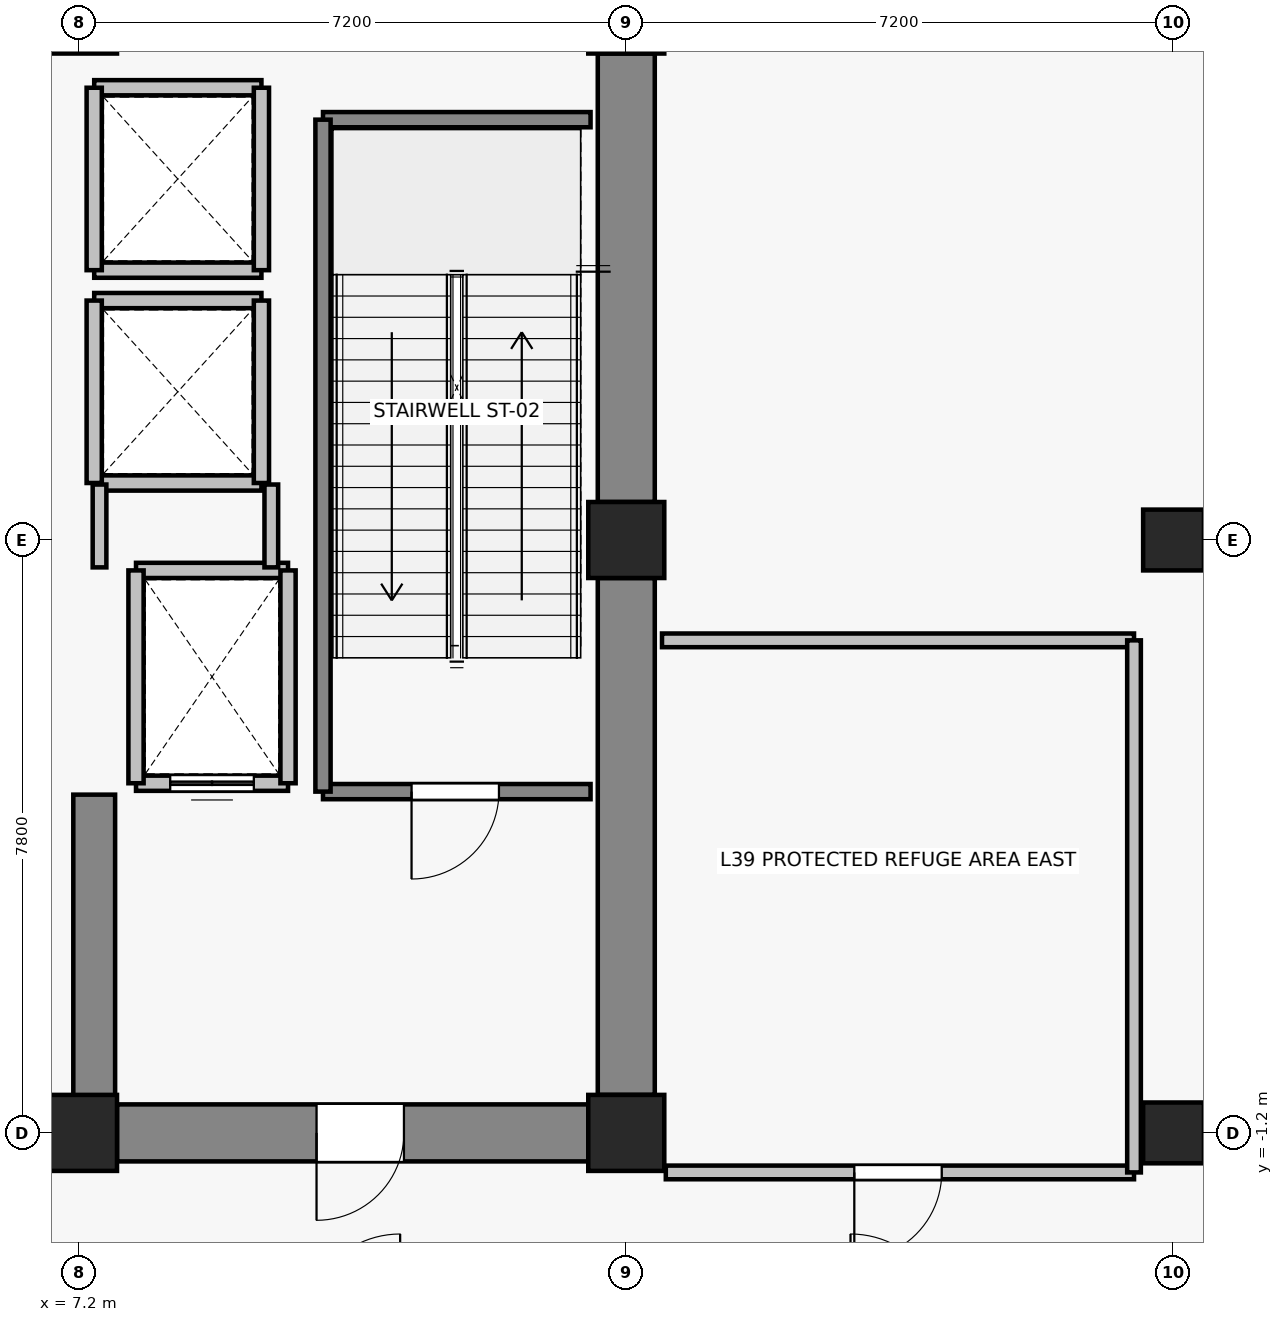
"""IFC4 building model, lengths in metres.
Left out: names, types, materials, properties, quantities, classifications, styles, units other than length and angle.
Written with IfcOpenShell. Run it as: python <this file> out.ifc"""

import sys

from ifc_helpers import new_model, si_unit, direction, frame, frame_2d, origin, origin_2d, place, context, subcontext, project, spatial, rectangle, extrude, source, transform, mapped, element, fill, save


model = new_model("IFC4")
c1 = context("Model", 3, precision=1e-05, world=origin(), true_north=direction((0.0, 1.0)))
c2 = subcontext(c1, "Body", "Model", "MODEL_VIEW")
j1 = project(units=[si_unit("LENGTHUNIT", "METRE"), si_unit("PLANEANGLEUNIT", "RADIAN")], contexts=[c1])
p1 = place(None, origin())
s1 = spatial("IfcSite", under=j1, at=p1, CompositionType="ELEMENT")
p2 = place(p1, origin())
s2 = spatial("IfcBuilding", under=s1, at=p2, CompositionType="ELEMENT")
p3 = place(p2, frame((0.0, 0.0, 139.6)))
s3 = spatial("IfcBuildingStorey", under=s2, at=p3, CompositionType="ELEMENT", Elevation=139.6)
for number, where, z_axis, x_axis in (
    (1, (7.2, -1.2, 0.0), (0.0, 0.0, 1.0), (1.0, 0.0, 0.0)),
    (2, (14.4, -1.2, 0.0), (0.0, 0.0, 1.0), (1.0, 0.0, 0.0)),
    (3, (14.4, 6.6, 0.0), (0.0, 0.0, 1.0), (1.0, 0.0, 0.0)),
    (4, (7.2, 13.5, 0.0), (0.0, 0.0, 1.0), (1.0, 0.0, 0.0)),
    (5, (14.4, 13.5, 0.0), (0.0, 0.0, 1.0), (1.0, 0.0, 0.0)),
):
    element("IfcColumn", number, at=place(p3, frame(where, z_axis=z_axis, x_axis=x_axis)), inside=s3, PredefinedType="COLUMN", context=c2, shape_type="SweptSolid", body=[
        extrude(rectangle(XDim=1.0, YDim=1.0, at=origin_2d()), origin(), (0.0, 0.0, 1.0), 6.6),
    ])
for number, where, z_axis, x_axis in (
    (6, (21.6, -1.2, 0.0), (0.0, 0.0, 1.0), (1.0, 0.0, 0.0)),
    (7, (21.6, 6.6, 0.0), (0.0, 0.0, 1.0), (1.0, 0.0, 0.0)),
):
    element("IfcColumn", number, at=place(p3, frame(where, z_axis=z_axis, x_axis=x_axis)), inside=s3, PredefinedType="COLUMN", context=c2, shape_type="SweptSolid", body=[
        extrude(rectangle(XDim=0.8, YDim=0.8, at=origin_2d()), origin(), (0.0, 0.0, 1.0), 6.6),
    ])
p4 = place(p3, frame((14.4, -0.7, 0.0), z_axis=(0.0, 0.0, 1.0), x_axis=(0.0, 1.0, 0.0)))
e8 = element("IfcWall", 8, at=p4, inside=s3, PredefinedType="SHEAR", context=c2, shape_type="SweptSolid", body=[
    extrude(rectangle(XDim=6.8, YDim=0.75, at=frame_2d((3.4, 0.0))), origin(), (0.0, 0.0, 1.0), 6.375),
])
p5 = place(p3, frame((14.4, 7.1, 0.0), z_axis=(0.0, 0.0, 1.0), x_axis=(0.0, 1.0, 0.0)))
e9 = element("IfcWall", 9, at=p5, inside=s3, PredefinedType="SHEAR", context=c2, shape_type="SweptSolid", body=[
    extrude(rectangle(XDim=5.9, YDim=0.75, at=frame_2d((2.95, 0.0))), origin(), (0.0, 0.0, 1.0), 6.375),
])
p6 = place(p3, frame((13.9, -1.2, 0.0), z_axis=(0.0, 0.0, 1.0), x_axis=(-1.0, 0.0, 0.0)))
e10 = element("IfcWall", 10, at=p6, inside=s3, PredefinedType="SHEAR", context=c2, shape_type="SweptSolid", body=[
    extrude(rectangle(XDim=6.2, YDim=0.75, at=frame_2d((3.1, 0.0))), origin(), (0.0, 0.0, 1.0), 6.375),
])
p7 = place(p6, frame((2.425, 0.0, 0.0)))
e11 = element("IfcOpeningElement", 11, at=p7, cuts=e10, PredefinedType="OPENING", context=c2, shape_type="SweptSolid", body=[
    extrude(rectangle(XDim=1.15, YDim=2.15, at=frame_2d((0.575, 1.075))), frame((0.0, 0.385, 0.0), z_axis=(0.0, -1.0, 0.0), x_axis=(1.0, 0.0, 0.0)), (0.0, 0.0, 1.0), 0.77),
])
p8 = place(p3, frame((7.4, -0.825, 0.0), z_axis=(0.0, 0.0, 1.0), x_axis=(0.0, 1.0, 0.0)))
e12 = element("IfcWall", 12, at=p8, inside=s3, PredefinedType="SHEAR", context=c2, shape_type="SweptSolid", body=[
    extrude(rectangle(XDim=4.075, YDim=0.55, at=frame_2d((2.038, 0.0))), origin(), (0.0, 0.0, 1.0), 6.375),
])
p9 = place(p3, frame((9.95, 3.4, 0.0), z_axis=(0.0, 0.0, 1.0), x_axis=(-1.0, 0.0, 0.0)))
e13 = element("IfcWall", 13, at=p9, inside=s3, PredefinedType="SOLIDWALL", context=c2, shape_type="SweptSolid", body=[
    extrude(rectangle(XDim=2.0, YDim=0.2, at=frame_2d((1.0, 0.0))), origin(), (0.0, 0.0, 1.0), 6.375),
])
p10 = place(p9, frame((0.45, 0.0, 0.0)))
e14 = element("IfcOpeningElement", 14, at=p10, cuts=e13, PredefinedType="OPENING", context=c2, shape_type="SweptSolid", body=[
    extrude(rectangle(XDim=1.1, YDim=2.2, at=frame_2d((0.55, 1.1))), frame((0.0, 0.11, 0.0), z_axis=(0.0, -1.0, 0.0), x_axis=(1.0, 0.0, 0.0)), (0.0, 0.0, 1.0), 0.22),
])
p11 = place(p3, frame((7.95, 6.2, 0.0), z_axis=(0.0, 0.0, 1.0), x_axis=(1.0, 0.0, 0.0)))
e15 = element("IfcWall", 15, at=p11, inside=s3, PredefinedType="SOLIDWALL", context=c2, shape_type="SweptSolid", body=[
    extrude(rectangle(XDim=2.0, YDim=0.2, at=frame_2d((1.0, 0.0))), origin(), (0.0, 0.0, 1.0), 6.375),
])
for number, where, z_axis, x_axis in (
    (16, (7.95, 3.4, 0.0), (0.0, 0.0, 1.0), (0.0, 1.0, 0.0)),
    (17, (9.95, 6.2, 0.0), (0.0, 0.0, 1.0), (0.0, -1.0, 0.0)),
):
    element("IfcWall", number, at=place(p3, frame(where, z_axis=z_axis, x_axis=x_axis)), inside=s3, PredefinedType="SOLIDWALL", context=c2, shape_type="SweptSolid", body=[
        extrude(rectangle(XDim=2.8, YDim=0.2, at=frame_2d((1.4, 0.0))), origin(), (0.0, 0.0, 1.0), 6.375),
    ])
for number, where, z_axis, x_axis in (
    (18, (9.6, 7.35, 0.0), (0.0, 0.0, 1.0), (-1.0, 0.0, 0.0)),
    (19, (7.4, 9.75, 0.0), (0.0, 0.0, 1.0), (1.0, 0.0, 0.0)),
):
    element("IfcWall", number, at=place(p3, frame(where, z_axis=z_axis, x_axis=x_axis)), inside=s3, PredefinedType="SOLIDWALL", context=c2, shape_type="SweptSolid", body=[
        extrude(rectangle(XDim=2.2, YDim=0.2, at=frame_2d((1.1, 0.0))), origin(), (0.0, 0.0, 1.0), 5.865),
    ])
p12 = place(p3, frame((7.4, 7.35, 0.0), z_axis=(0.0, 0.0, 1.0), x_axis=(0.0, 1.0, 0.0)))
e20 = element("IfcWall", 20, at=p12, inside=s3, PredefinedType="SOLIDWALL", context=c2, shape_type="SweptSolid", body=[
    extrude(rectangle(XDim=2.4, YDim=0.2, at=frame_2d((1.2, 0.0))), origin(), (0.0, 0.0, 1.0), 5.865),
])
p13 = place(p3, frame((9.6, 9.75, 0.0), z_axis=(0.0, 0.0, 1.0), x_axis=(0.0, -1.0, 0.0)))
e21 = element("IfcWall", 21, at=p13, inside=s3, PredefinedType="SOLIDWALL", context=c2, shape_type="SweptSolid", body=[
    extrude(rectangle(XDim=2.4, YDim=0.2, at=frame_2d((1.2, 0.0))), origin(), (0.0, 0.0, 1.0), 6.375),
])
for number, where, z_axis, x_axis in (
    (22, (9.6, 10.15, 0.0), (0.0, 0.0, 1.0), (-1.0, 0.0, 0.0)),
    (23, (7.4, 12.55, 0.0), (0.0, 0.0, 1.0), (1.0, 0.0, 0.0)),
):
    element("IfcWall", number, at=place(p3, frame(where, z_axis=z_axis, x_axis=x_axis)), inside=s3, PredefinedType="SOLIDWALL", context=c2, shape_type="SweptSolid", body=[
        extrude(rectangle(XDim=2.2, YDim=0.2, at=frame_2d((1.1, 0.0))), origin(), (0.0, 0.0, 1.0), 5.865),
    ])
p14 = place(p3, frame((7.4, 10.15, 0.0), z_axis=(0.0, 0.0, 1.0), x_axis=(0.0, 1.0, 0.0)))
e24 = element("IfcWall", 24, at=p14, inside=s3, PredefinedType="SOLIDWALL", context=c2, shape_type="SweptSolid", body=[
    extrude(rectangle(XDim=2.4, YDim=0.2, at=frame_2d((1.2, 0.0))), origin(), (0.0, 0.0, 1.0), 5.865),
])
p15 = place(p3, frame((9.6, 12.55, 0.0), z_axis=(0.0, 0.0, 1.0), x_axis=(0.0, -1.0, 0.0)))
e25 = element("IfcWall", 25, at=p15, inside=s3, PredefinedType="SOLIDWALL", context=c2, shape_type="SweptSolid", body=[
    extrude(rectangle(XDim=2.4, YDim=0.2, at=frame_2d((1.2, 0.0))), origin(), (0.0, 0.0, 1.0), 6.375),
])
p16 = place(p3, frame((13.93, 3.29, 0.0), z_axis=(0.0, 0.0, 1.0), x_axis=(-1.0, 0.0, 0.0)))
e26 = element("IfcWall", 26, at=p16, inside=s3, PredefinedType="SOLIDWALL", context=c2, shape_type="SweptSolid", body=[
    extrude(rectangle(XDim=3.52, YDim=0.2, at=frame_2d((1.76, 0.0))), origin(), (0.0, 0.0, 1.0), 6.375),
])
p17 = place(p16, frame((1.205, 0.0, 0.0)))
e27 = element("IfcOpeningElement", 27, at=p17, cuts=e26, PredefinedType="OPENING", context=c2, shape_type="SweptSolid", body=[
    extrude(rectangle(XDim=1.15, YDim=2.15, at=frame_2d((0.575, 1.075))), frame((0.0, 0.11, 0.0), z_axis=(0.0, -1.0, 0.0), x_axis=(1.0, 0.0, 0.0)), (0.0, 0.0, 1.0), 0.22),
])
p18 = place(p3, frame((10.41, 12.13, 0.0), z_axis=(0.0, 0.0, 1.0), x_axis=(1.0, 0.0, 0.0)))
e28 = element("IfcWall", 28, at=p18, inside=s3, PredefinedType="SOLIDWALL", context=c2, shape_type="SweptSolid", body=[
    extrude(rectangle(XDim=3.52, YDim=0.2, at=frame_2d((1.76, 0.0))), origin(), (0.0, 0.0, 1.0), 6.375),
])
p19 = place(p3, frame((10.41, 3.29, 0.0), z_axis=(0.0, 0.0, 1.0), x_axis=(0.0, 1.0, 0.0)))
e29 = element("IfcWall", 29, at=p19, inside=s3, PredefinedType="SOLIDWALL", context=c2, shape_type="SweptSolid", body=[
    extrude(rectangle(XDim=8.84, YDim=0.2, at=frame_2d((4.42, 0.0))), origin(), (0.0, 0.0, 1.0), 6.375),
])
p20 = place(p3, frame((7.47, 6.24, 0.0), z_axis=(0.0, 0.0, 1.0), x_axis=(0.0, 1.0, 0.0)))
e30 = element("IfcWall", 30, at=p20, inside=s3, PredefinedType="PARTITIONING", context=c2, shape_type="SweptSolid", body=[
    extrude(rectangle(XDim=1.09, YDim=0.18, at=frame_2d((0.545, 0.0))), origin(), (0.0, 0.0, 1.0), 5.865),
])
p21 = place(p3, frame((9.73, 7.33, 0.0), z_axis=(0.0, 0.0, 1.0), x_axis=(0.0, -1.0, 0.0)))
e31 = element("IfcWall", 31, at=p21, inside=s3, PredefinedType="PARTITIONING", context=c2, shape_type="SweptSolid", body=[
    extrude(rectangle(XDim=1.09, YDim=0.18, at=frame_2d((0.545, 0.0))), origin(), (0.0, 0.0, 1.0), 6.375),
])
p22 = place(p3, frame((21.08, -1.72, 0.0), z_axis=(0.0, 0.0, 1.0), x_axis=(-1.0, 0.0, 0.0)))
e32 = element("IfcWall", 32, at=p22, inside=s3, PredefinedType="PARTITIONING", context=c2, shape_type="SweptSolid", body=[
    extrude(rectangle(XDim=6.16, YDim=0.18, at=frame_2d((3.08, 0.0))), origin(), (0.0, 0.0, 1.0), 6.375),
])
p23 = place(p22, frame((2.53, 0.0, 0.0)))
e33 = element("IfcOpeningElement", 33, at=p23, cuts=e32, PredefinedType="OPENING", context=c2, shape_type="SweptSolid", body=[
    extrude(rectangle(XDim=1.15, YDim=2.15, at=frame_2d((0.575, 1.075))), frame((0.0, 0.1, 0.0), z_axis=(0.0, -1.0, 0.0), x_axis=(1.0, 0.0, 0.0)), (0.0, 0.0, 1.0), 0.2),
])
p24 = place(p3, frame((14.87, 5.28, 0.0), z_axis=(0.0, 0.0, 1.0), x_axis=(1.0, 0.0, 0.0)))
e34 = element("IfcWall", 34, at=p24, inside=s3, PredefinedType="PARTITIONING", context=c2, shape_type="SweptSolid", body=[
    extrude(rectangle(XDim=6.21, YDim=0.18, at=frame_2d((3.105, 0.0))), origin(), (0.0, 0.0, 1.0), 6.375),
])
p25 = place(p3, frame((21.08, 5.28, 0.0), z_axis=(0.0, 0.0, 1.0), x_axis=(0.0, -1.0, 0.0)))
e35 = element("IfcWall", 35, at=p25, inside=s3, PredefinedType="PARTITIONING", context=c2, shape_type="SweptSolid", body=[
    extrude(rectangle(XDim=7.0, YDim=0.18, at=frame_2d((3.5, 0.0))), origin(), (0.0, 0.0, 1.0), 5.865),
])
m1 = source(origin(), c2, "Body", "SweptSolid", [
    extrude(rectangle(XDim=1.1, YDim=2.2, at=frame_2d((0.55, 1.1))), frame((0.0, 0.025, 0.0), z_axis=(0.0, -1.0, 0.0), x_axis=(1.0, 0.0, 0.0)), (0.0, 0.0, 1.0), 0.05),
])
p26 = place(p10, origin())
e36 = element("IfcDoor", 36, at=p26, inside=s3, OperationType="DOUBLE_DOOR_SLIDING", PredefinedType="DOOR", context=c2, shape_type="MappedRepresentation", body=[
    mapped(m1, transform((0.0, 0.0, 0.0), x_axis=(1.0, 0.0, 0.0), y_axis=(0.0, 1.0, 0.0), z_axis=(0.0, 0.0, 1.0), scale=1.0)),
])
fill(e14, e36)
m2 = source(origin(), c2, "Body", "SweptSolid", [
    extrude(rectangle(XDim=1.15, YDim=2.15, at=frame_2d((0.575, 1.075))), frame((0.0, 0.025, 0.0), z_axis=(0.0, -1.0, 0.0), x_axis=(1.0, 0.0, 0.0)), (0.0, 0.0, 1.0), 0.05),
])
p27 = place(p17, origin())
e37 = element("IfcDoor", 37, at=p27, inside=s3, OperationType="SINGLE_SWING_RIGHT", PredefinedType="DOOR", context=c2, shape_type="MappedRepresentation", body=[
    mapped(m2, transform((0.0, 0.0, 0.0), x_axis=(1.0, 0.0, 0.0), y_axis=(0.0, 1.0, 0.0), z_axis=(0.0, 0.0, 1.0), scale=1.0)),
])
fill(e27, e37)
p28 = place(p7, origin())
e38 = element("IfcDoor", 38, at=p28, inside=s3, OperationType="SINGLE_SWING_RIGHT", PredefinedType="DOOR", context=c2, shape_type="MappedRepresentation", body=[
    mapped(m2, transform((0.0, 0.0, 0.0), x_axis=(1.0, 0.0, 0.0), y_axis=(0.0, 1.0, 0.0), z_axis=(0.0, 0.0, 1.0), scale=1.0)),
])
fill(e11, e38)
p29 = place(p23, origin())
e39 = element("IfcDoor", 39, at=p29, inside=s3, OperationType="SINGLE_SWING_RIGHT", PredefinedType="DOOR", context=c2, shape_type="MappedRepresentation", body=[
    mapped(m2, transform((0.0, 0.0, 0.0), x_axis=(1.0, 0.0, 0.0), y_axis=(0.0, 1.0, 0.0), z_axis=(0.0, 0.0, 1.0), scale=1.0)),
])
fill(e33, e39)
save(model, sys.argv[1])
